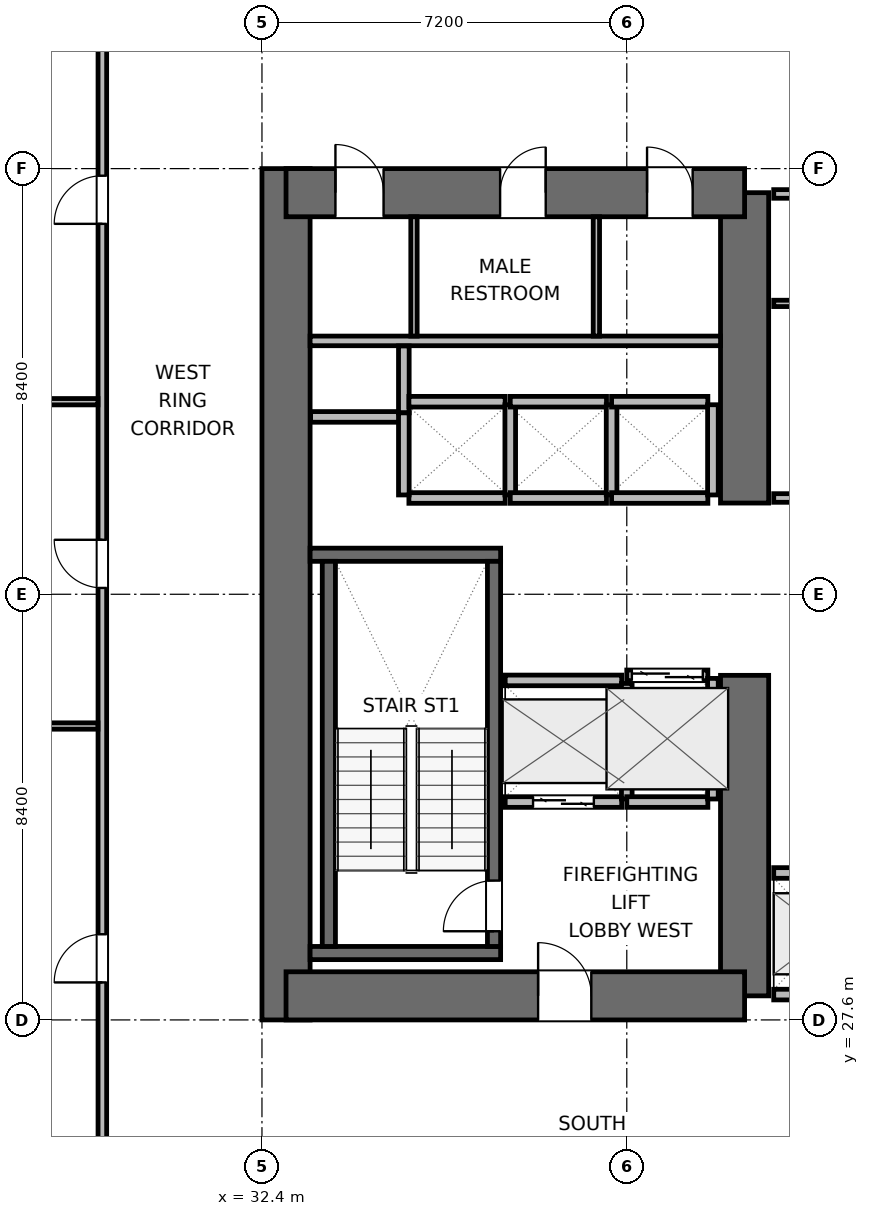
"""IFC4 building model, lengths in metres.
Left out: names, types, materials, properties, quantities, classifications, styles, units other than length and angle.
Written with IfcOpenShell. Run it as: python <this file> out.ifc"""

import sys

from ifc_helpers import new_model, si_unit, direction, frame, frame_2d, origin, place, context, subcontext, project, spatial, rectangle, extrude, element, fill, save


model = new_model("IFC4")
c1 = context("Model", 3, precision=1e-05, world=origin(), true_north=direction((0.0, 1.0)))
c2 = subcontext(c1, "Body", "Model", "MODEL_VIEW")
j1 = project(units=[si_unit("LENGTHUNIT", "METRE"), si_unit("PLANEANGLEUNIT", "RADIAN")], contexts=[c1])
p1 = place(None, origin())
s1 = spatial("IfcSite", under=j1, at=p1, CompositionType="ELEMENT")
p2 = place(p1, origin())
s2 = spatial("IfcBuilding", under=s1, at=p2, CompositionType="ELEMENT")
p3 = place(p2, frame((0.0, 0.0, 89.7)))
s3 = spatial("IfcBuildingStorey", under=s2, at=p3, CompositionType="ELEMENT", Elevation=89.7)
p4 = place(p3, frame((32.875, 27.6, 0.0), z_axis=(0.0, 0.0, 1.0), x_axis=(0.0, 1.0, 0.0)))
e1 = element("IfcWall", 1, at=p4, inside=s3, PredefinedType="SHEAR", context=c2, shape_type="SweptSolid", body=[
    extrude(rectangle(XDim=16.8, YDim=0.95, at=frame_2d((8.4, 0.0))), origin(), (0.0, 0.0, 1.0), 3.9),
])
p5 = place(p3, frame((41.925, 28.075, 0.0), z_axis=(0.0, 0.0, 1.0), x_axis=(0.0, 1.0, 0.0)))
e2 = element("IfcWall", 2, at=p5, inside=s3, PredefinedType="SHEAR", context=c2, shape_type="SweptSolid", body=[
    extrude(rectangle(XDim=6.325, YDim=0.95, at=frame_2d((3.163, 0.0))), origin(), (0.0, 0.0, 1.0), 3.9),
])
p6 = place(p3, frame((41.925, 37.8, 0.0), z_axis=(0.0, 0.0, 1.0), x_axis=(0.0, 1.0, 0.0)))
e3 = element("IfcWall", 3, at=p6, inside=s3, PredefinedType="SHEAR", context=c2, shape_type="SweptSolid", body=[
    extrude(rectangle(XDim=6.125, YDim=0.95, at=frame_2d((3.062, 0.0))), origin(), (0.0, 0.0, 1.0), 3.9),
])
p7 = place(p3, frame((32.875, 28.075, 0.0), z_axis=(0.0, 0.0, 1.0), x_axis=(1.0, 0.0, 0.0)))
e4 = element("IfcWall", 4, at=p7, inside=s3, PredefinedType="SHEAR", context=c2, shape_type="SweptSolid", body=[
    extrude(rectangle(XDim=9.05, YDim=0.95, at=frame_2d((4.525, 0.0))), origin(), (0.0, 0.0, 1.0), 3.9),
])
p8 = place(p7, frame((4.975, 0.0, 0.0)))
e5 = element("IfcOpeningElement", 5, at=p8, cuts=e4, PredefinedType="OPENING", context=c2, shape_type="SweptSolid", body=[
    extrude(rectangle(XDim=1.05, YDim=2.04, at=frame_2d((0.525, 1.02))), frame((0.0, 0.485, 0.0), z_axis=(0.0, -1.0, 0.0), x_axis=(1.0, 0.0, 0.0)), (0.0, 0.0, 1.0), 0.97),
])
p9 = place(p3, frame((32.875, 43.925, 0.0), z_axis=(0.0, 0.0, 1.0), x_axis=(1.0, 0.0, 0.0)))
e6 = element("IfcWall", 6, at=p9, inside=s3, PredefinedType="SHEAR", context=c2, shape_type="SweptSolid", body=[
    extrude(rectangle(XDim=9.05, YDim=0.95, at=frame_2d((4.525, 0.0))), origin(), (0.0, 0.0, 1.0), 3.9),
])
p10 = place(p9, frame((0.975, 0.0, 0.0)))
e7 = element("IfcOpeningElement", 7, at=p10, cuts=e6, PredefinedType="OPENING", context=c2, shape_type="SweptSolid", body=[
    extrude(rectangle(XDim=0.95, YDim=2.04, at=frame_2d((0.475, 1.02))), frame((0.0, 0.485, 0.0), z_axis=(0.0, -1.0, 0.0), x_axis=(1.0, 0.0, 0.0)), (0.0, 0.0, 1.0), 0.97),
])
p11 = place(p9, frame((4.225, 0.0, 0.0)))
e8 = element("IfcOpeningElement", 8, at=p11, cuts=e6, PredefinedType="OPENING", context=c2, shape_type="SweptSolid", body=[
    extrude(rectangle(XDim=0.9, YDim=2.02, at=frame_2d((0.45, 1.01))), frame((0.0, 0.485, 0.0), z_axis=(0.0, -1.0, 0.0), x_axis=(1.0, 0.0, 0.0)), (0.0, 0.0, 1.0), 0.97),
])
p12 = place(p9, frame((7.125, 0.0, 0.0)))
e9 = element("IfcOpeningElement", 9, at=p12, cuts=e6, PredefinedType="OPENING", context=c2, shape_type="SweptSolid", body=[
    extrude(rectangle(XDim=0.9, YDim=2.02, at=frame_2d((0.45, 1.01))), frame((0.0, 0.485, 0.0), z_axis=(0.0, -1.0, 0.0), x_axis=(1.0, 0.0, 0.0)), (0.0, 0.0, 1.0), 0.97),
])
for number, where, z_axis, x_axis in (
    (10, (33.35, 28.92, 0.0), (0.0, 0.0, 1.0), (1.0, 0.0, 0.0)),
    (11, (33.35, 36.78, 0.0), (0.0, 0.0, 1.0), (1.0, 0.0, 0.0)),
):
    element("IfcWall", number, at=place(p3, frame(where, z_axis=z_axis, x_axis=x_axis)), inside=s3, PredefinedType="SHEAR", context=c2, shape_type="SweptSolid", body=[
        extrude(rectangle(XDim=3.76, YDim=0.26, at=frame_2d((1.88, 0.0))), origin(), (0.0, 0.0, 1.0), 3.9),
    ])
p13 = place(p3, frame((33.72, 29.05, 0.0), z_axis=(0.0, 0.0, 1.0), x_axis=(0.0, 1.0, 0.0)))
e12 = element("IfcWall", 12, at=p13, inside=s3, PredefinedType="SHEAR", context=c2, shape_type="SweptSolid", body=[
    extrude(rectangle(XDim=7.6, YDim=0.26, at=frame_2d((3.8, 0.0))), origin(), (0.0, 0.0, 1.0), 3.9),
])
p14 = place(p3, frame((36.98, 29.05, 0.0), z_axis=(0.0, 0.0, 1.0), x_axis=(0.0, 1.0, 0.0)))
e13 = element("IfcWall", 13, at=p14, inside=s3, PredefinedType="SHEAR", context=c2, shape_type="SweptSolid", body=[
    extrude(rectangle(XDim=7.6, YDim=0.26, at=frame_2d((3.8, 0.0))), origin(), (0.0, 0.0, 1.0), 3.9),
])
p15 = place(p14, frame((0.3, 0.0, 0.0)))
e14 = element("IfcOpeningElement", 14, at=p15, cuts=e13, PredefinedType="OPENING", context=c2, shape_type="SweptSolid", body=[
    extrude(rectangle(XDim=1.0, YDim=2.04, at=frame_2d((0.5, 1.02))), frame((0.0, 0.14, 0.0), z_axis=(0.0, -1.0, 0.0), x_axis=(1.0, 0.0, 0.0)), (0.0, 0.0, 1.0), 0.28),
])
p16 = place(p3, frame((33.35, 41.0, 0.0), z_axis=(0.0, 0.0, 1.0), x_axis=(1.0, 0.0, 0.0)))
e15 = element("IfcWall", 15, at=p16, inside=s3, PredefinedType="PLUMBINGWALL", context=c2, shape_type="SweptSolid", body=[
    extrude(rectangle(XDim=8.1, YDim=0.19, at=frame_2d((4.05, 0.0))), origin(), (0.0, 0.0, 1.0), 3.64),
])
for number, where, z_axis, x_axis in (
    (16, (35.4, 41.095, 0.0), (0.0, 0.0, 1.0), (0.0, 1.0, 0.0)),
    (17, (39.0, 41.095, 0.0), (0.0, 0.0, 1.0), (0.0, 1.0, 0.0)),
):
    element("IfcWall", number, at=place(p3, frame(where, z_axis=z_axis, x_axis=x_axis)), inside=s3, PredefinedType="PARTITIONING", context=c2, shape_type="SweptSolid", body=[
        extrude(rectangle(XDim=2.355, YDim=0.125, at=frame_2d((1.177, 0.0))), origin(), (0.0, 0.0, 1.0), 3.64),
    ])
p17 = place(p3, frame((33.36, 39.5, 0.0), z_axis=(0.0, 0.0, 1.0), x_axis=(1.0, 0.0, 0.0)))
e18 = element("IfcWall", 18, at=p17, inside=s3, PredefinedType="PARTITIONING", context=c2, shape_type="SweptSolid", body=[
    extrude(rectangle(XDim=1.86, YDim=0.21, at=frame_2d((0.93, 0.0))), origin(), (0.0, 0.0, 1.0), 3.64),
])
p18 = place(p3, frame((35.2, 39.58, 0.0), z_axis=(0.0, 0.0, 1.0), x_axis=(0.0, 1.0, 0.0)))
e19 = element("IfcWall", 19, at=p18, inside=s3, PredefinedType="PARTITIONING", context=c2, shape_type="SweptSolid", body=[
    extrude(rectangle(XDim=1.32, YDim=0.21, at=frame_2d((0.66, 0.0))), origin(), (0.0, 0.0, 1.0), 3.64),
])
p19 = place(p3, frame((37.2, 31.9, 0.0), z_axis=(0.0, 0.0, 1.0), x_axis=(1.0, 0.0, 0.0)))
e20 = element("IfcWall", 20, at=p19, inside=s3, PredefinedType="PARTITIONING", context=c2, shape_type="SweptSolid", body=[
    extrude(rectangle(XDim=2.3, YDim=0.21, at=frame_2d((1.15, 0.0))), origin(), (0.0, 0.0, 1.0), 3.64),
])
p20 = place(p19, frame((0.55, 0.0, 0.0)))
e21 = element("IfcOpeningElement", 21, at=p20, cuts=e20, PredefinedType="OPENING", context=c2, shape_type="SweptSolid", body=[
    extrude(rectangle(XDim=1.2, YDim=2.04, at=frame_2d((0.6, 1.02))), frame((0.0, 0.115, 0.0), z_axis=(0.0, -1.0, 0.0), x_axis=(1.0, 0.0, 0.0)), (0.0, 0.0, 1.0), 0.23),
])
p21 = place(p3, frame((37.2, 34.3, 0.0), z_axis=(0.0, 0.0, 1.0), x_axis=(1.0, 0.0, 0.0)))
e22 = element("IfcWall", 22, at=p21, inside=s3, PredefinedType="PARTITIONING", context=c2, shape_type="SweptSolid", body=[
    extrude(rectangle(XDim=2.3, YDim=0.21, at=frame_2d((1.15, 0.0))), origin(), (0.0, 0.0, 1.0), 3.64),
])
p22 = place(p3, frame((39.6, 31.96, 0.0), z_axis=(0.0, 0.0, 1.0), x_axis=(0.0, 1.0, 0.0)))
e23 = element("IfcWall", 23, at=p22, inside=s3, PredefinedType="PARTITIONING", context=c2, shape_type="SweptSolid", body=[
    extrude(rectangle(XDim=2.28, YDim=0.21, at=frame_2d((1.14, 0.0))), origin(), (0.0, 0.0, 1.0), 3.64),
])
p23 = place(p3, frame((39.6, 34.4, 0.0), z_axis=(0.0, 0.0, 1.0), x_axis=(1.0, 0.0, 0.0)))
e24 = element("IfcWall", 24, at=p23, inside=s3, PredefinedType="PARTITIONING", context=c2, shape_type="SweptSolid", body=[
    extrude(rectangle(XDim=1.6, YDim=0.21, at=frame_2d((0.8, 0.0))), origin(), (0.0, 0.0, 1.0), 3.64),
])
p24 = place(p23, frame((0.1, 0.0, 0.0)))
e25 = element("IfcOpeningElement", 25, at=p24, cuts=e24, PredefinedType="OPENING", context=c2, shape_type="SweptSolid", body=[
    extrude(rectangle(XDim=1.4, YDim=2.06, at=frame_2d((0.7, 1.03))), frame((0.0, 0.115, 0.0), z_axis=(0.0, -1.0, 0.0), x_axis=(1.0, 0.0, 0.0)), (0.0, 0.0, 1.0), 0.23),
])
p25 = place(p3, frame((39.6, 31.9, 0.0), z_axis=(0.0, 0.0, 1.0), x_axis=(1.0, 0.0, 0.0)))
e26 = element("IfcWall", 26, at=p25, inside=s3, PredefinedType="PARTITIONING", context=c2, shape_type="SweptSolid", body=[
    extrude(rectangle(XDim=1.6, YDim=0.21, at=frame_2d((0.8, 0.0))), origin(), (0.0, 0.0, 1.0), 3.64),
])
p26 = place(p3, frame((41.3, 31.96, 0.0), z_axis=(0.0, 0.0, 1.0), x_axis=(0.0, 1.0, 0.0)))
e27 = element("IfcWall", 27, at=p26, inside=s3, PredefinedType="PARTITIONING", context=c2, shape_type="SweptSolid", body=[
    extrude(rectangle(XDim=2.38, YDim=0.21, at=frame_2d((1.19, 0.0))), origin(), (0.0, 0.0, 1.0), 3.64),
])
p27 = place(p3, frame((42.5, 30.5, 0.0), z_axis=(0.0, 0.0, 1.0), x_axis=(1.0, 0.0, 0.0)))
e28 = element("IfcWall", 28, at=p27, inside=s3, PredefinedType="PARTITIONING", context=c2, shape_type="SweptSolid", body=[
    extrude(rectangle(XDim=2.1, YDim=0.21, at=frame_2d((1.05, 0.0))), origin(), (0.0, 0.0, 1.0), 3.64),
])
p28 = place(p27, frame((0.5, 0.0, 0.0)))
e29 = element("IfcOpeningElement", 29, at=p28, cuts=e28, PredefinedType="OPENING", context=c2, shape_type="SweptSolid", body=[
    extrude(rectangle(XDim=1.1, YDim=2.04, at=frame_2d((0.55, 1.02))), frame((0.0, 0.115, 0.0), z_axis=(0.0, -1.0, 0.0), x_axis=(1.0, 0.0, 0.0)), (0.0, 0.0, 1.0), 0.23),
])
p29 = place(p3, frame((42.5, 28.1, 0.0), z_axis=(0.0, 0.0, 1.0), x_axis=(1.0, 0.0, 0.0)))
e30 = element("IfcWall", 30, at=p29, inside=s3, PredefinedType="PARTITIONING", context=c2, shape_type="SweptSolid", body=[
    extrude(rectangle(XDim=2.1, YDim=0.21, at=frame_2d((1.05, 0.0))), origin(), (0.0, 0.0, 1.0), 2.525),
])
for number, where, z_axis, x_axis in (
    (31, (35.3, 37.9, 0.0), (0.0, 0.0, 1.0), (1.0, 0.0, 0.0)),
    (32, (35.3, 39.8, 0.0), (0.0, 0.0, 1.0), (1.0, 0.0, 0.0)),
):
    element("IfcWall", number, at=place(p3, frame(where, z_axis=z_axis, x_axis=x_axis)), inside=s3, PredefinedType="PARTITIONING", context=c2, shape_type="SweptSolid", body=[
        extrude(rectangle(XDim=1.9, YDim=0.21, at=frame_2d((0.95, 0.0))), origin(), (0.0, 0.0, 1.0), 3.64),
    ])
p30 = place(p3, frame((35.2, 37.96, 0.0), z_axis=(0.0, 0.0, 1.0), x_axis=(0.0, 1.0, 0.0)))
e33 = element("IfcWall", 33, at=p30, inside=s3, PredefinedType="PARTITIONING", context=c2, shape_type="SweptSolid", body=[
    extrude(rectangle(XDim=1.62, YDim=0.21, at=frame_2d((0.81, 0.0))), origin(), (0.0, 0.0, 1.0), 3.64),
])
p31 = place(p3, frame((37.3, 37.96, 0.0), z_axis=(0.0, 0.0, 1.0), x_axis=(0.0, 1.0, 0.0)))
e34 = element("IfcWall", 34, at=p31, inside=s3, PredefinedType="PARTITIONING", context=c2, shape_type="SweptSolid", body=[
    extrude(rectangle(XDim=1.78, YDim=0.21, at=frame_2d((0.89, 0.0))), origin(), (0.0, 0.0, 1.0), 3.64),
])
for number, where, z_axis, x_axis in (
    (35, (37.3, 37.9, 0.0), (0.0, 0.0, 1.0), (1.0, 0.0, 0.0)),
    (36, (37.3, 39.8, 0.0), (0.0, 0.0, 1.0), (1.0, 0.0, 0.0)),
):
    element("IfcWall", number, at=place(p3, frame(where, z_axis=z_axis, x_axis=x_axis)), inside=s3, PredefinedType="PARTITIONING", context=c2, shape_type="SweptSolid", body=[
        extrude(rectangle(XDim=1.9, YDim=0.21, at=frame_2d((0.95, 0.0))), origin(), (0.0, 0.0, 1.0), 3.64),
    ])
p32 = place(p3, frame((39.3, 37.96, 0.0), z_axis=(0.0, 0.0, 1.0), x_axis=(0.0, 1.0, 0.0)))
e37 = element("IfcWall", 37, at=p32, inside=s3, PredefinedType="PARTITIONING", context=c2, shape_type="SweptSolid", body=[
    extrude(rectangle(XDim=1.78, YDim=0.21, at=frame_2d((0.89, 0.0))), origin(), (0.0, 0.0, 1.0), 3.64),
])
for number, where, z_axis, x_axis in (
    (38, (39.3, 37.9, 0.0), (0.0, 0.0, 1.0), (1.0, 0.0, 0.0)),
    (39, (39.3, 39.8, 0.0), (0.0, 0.0, 1.0), (1.0, 0.0, 0.0)),
):
    element("IfcWall", number, at=place(p3, frame(where, z_axis=z_axis, x_axis=x_axis)), inside=s3, PredefinedType="PARTITIONING", context=c2, shape_type="SweptSolid", body=[
        extrude(rectangle(XDim=1.9, YDim=0.21, at=frame_2d((0.95, 0.0))), origin(), (0.0, 0.0, 1.0), 3.64),
    ])
p33 = place(p3, frame((41.3, 37.96, 0.0), z_axis=(0.0, 0.0, 1.0), x_axis=(0.0, 1.0, 0.0)))
e40 = element("IfcWall", 40, at=p33, inside=s3, PredefinedType="PARTITIONING", context=c2, shape_type="SweptSolid", body=[
    extrude(rectangle(XDim=1.78, YDim=0.21, at=frame_2d((0.89, 0.0))), origin(), (0.0, 0.0, 1.0), 3.64),
])
p34 = place(p3, frame((42.5, 37.9, 0.0), z_axis=(0.0, 0.0, 1.0), x_axis=(1.0, 0.0, 0.0)))
e41 = element("IfcWall", 41, at=p34, inside=s3, PredefinedType="PARTITIONING", context=c2, shape_type="SweptSolid", body=[
    extrude(rectangle(XDim=4.213, YDim=0.17, at=frame_2d((2.106, 0.0))), origin(), (0.0, 0.0, 1.0), 3.64),
])
p35 = place(p3, frame((42.5, 43.9, 0.0), z_axis=(0.0, 0.0, 1.0), x_axis=(1.0, 0.0, 0.0)))
e42 = element("IfcWall", 42, at=p35, inside=s3, PredefinedType="PARTITIONING", context=c2, shape_type="SweptSolid", body=[
    extrude(rectangle(XDim=4.213, YDim=0.17, at=frame_2d((2.106, 0.0))), origin(), (0.0, 0.0, 1.0), 2.525),
])
p36 = place(p3, frame((42.5, 41.74, 0.0), z_axis=(0.0, 0.0, 1.0), x_axis=(1.0, 0.0, 0.0)))
e43 = element("IfcWall", 43, at=p36, inside=s3, PredefinedType="PARTITIONING", context=c2, shape_type="SweptSolid", body=[
    extrude(rectangle(XDim=4.213, YDim=0.125, at=frame_2d((2.106, 0.0))), origin(), (0.0, 0.0, 1.0), 3.64),
])
p37 = place(p3, frame((29.25, 24.317, 0.0), z_axis=(0.0, 0.0, 1.0), x_axis=(0.0, 1.0, 0.0)))
e44 = element("IfcWall", 44, at=p37, inside=s3, PredefinedType="PARTITIONING", context=c2, shape_type="SweptSolid", body=[
    extrude(rectangle(XDim=23.366, YDim=0.17, at=frame_2d((11.683, 0.0))), origin(), (0.0, 0.0, 1.0), 3.64),
])
p38 = place(p37, frame((4.023, 0.0, 0.0)))
e45 = element("IfcOpeningElement", 45, at=p38, cuts=e44, PredefinedType="OPENING", context=c2, shape_type="SweptSolid", body=[
    extrude(rectangle(XDim=0.95, YDim=2.04, at=frame_2d((0.475, 1.02))), frame((0.0, 0.095, 0.0), z_axis=(0.0, -1.0, 0.0), x_axis=(1.0, 0.0, 0.0)), (0.0, 0.0, 1.0), 0.19),
])
p39 = place(p37, frame((11.808, 0.0, 0.0)))
e46 = element("IfcOpeningElement", 46, at=p39, cuts=e44, PredefinedType="OPENING", context=c2, shape_type="SweptSolid", body=[
    extrude(rectangle(XDim=0.95, YDim=2.04, at=frame_2d((0.475, 1.02))), frame((0.0, 0.095, 0.0), z_axis=(0.0, -1.0, 0.0), x_axis=(1.0, 0.0, 0.0)), (0.0, 0.0, 1.0), 0.19),
])
p40 = place(p37, frame((18.993, 0.0, 0.0)))
e47 = element("IfcOpeningElement", 47, at=p40, cuts=e44, PredefinedType="OPENING", context=c2, shape_type="SweptSolid", body=[
    extrude(rectangle(XDim=0.95, YDim=2.04, at=frame_2d((0.475, 1.02))), frame((0.0, 0.095, 0.0), z_axis=(0.0, -1.0, 0.0), x_axis=(1.0, 0.0, 0.0)), (0.0, 0.0, 1.0), 0.19),
])
p41 = place(p3, frame((20.375, 33.4, 0.0), z_axis=(0.0, 0.0, 1.0), x_axis=(1.0, 0.0, 0.0)))
e48 = element("IfcWall", 48, at=p41, inside=s3, PredefinedType="PARTITIONING", context=c2, shape_type="SweptSolid", body=[
    extrude(rectangle(XDim=8.788, YDim=0.125, at=frame_2d((4.394, 0.0))), origin(), (0.0, 0.0, 1.0), 3.64),
])
p42 = place(p3, frame((18.245, 39.8, 0.0), z_axis=(0.0, 0.0, 1.0), x_axis=(1.0, 0.0, 0.0)))
e49 = element("IfcWall", 49, at=p42, inside=s3, PredefinedType="PARTITIONING", context=c2, shape_type="SweptSolid", body=[
    extrude(rectangle(XDim=10.918, YDim=0.125, at=frame_2d((5.459, 0.0))), origin(), (0.0, 0.0, 1.0), 3.64),
])
p43 = place(p15, origin())
e50 = element("IfcDoor", 50, at=p43, inside=s3, OperationType="SINGLE_SWING_LEFT", PredefinedType="DOOR", context=c2, shape_type="SweptSolid", body=[
    extrude(rectangle(XDim=1.0, YDim=2.04, at=frame_2d((0.5, 1.02))), frame((0.0, 0.025, 0.0), z_axis=(0.0, -1.0, 0.0), x_axis=(1.0, 0.0, 0.0)), (0.0, 0.0, 1.0), 0.05),
])
fill(e14, e50)
p44 = place(p20, origin())
e51 = element("IfcDoor", 51, at=p44, inside=s3, OperationType="DOUBLE_DOOR_SLIDING", PredefinedType="DOOR", context=c2, shape_type="SweptSolid", body=[
    extrude(rectangle(XDim=1.2, YDim=2.04, at=frame_2d((0.6, 1.02))), frame((0.0, 0.025, 0.0), z_axis=(0.0, -1.0, 0.0), x_axis=(1.0, 0.0, 0.0)), (0.0, 0.0, 1.0), 0.05),
])
fill(e21, e51)
p45 = place(p24, origin())
e52 = element("IfcDoor", 52, at=p45, inside=s3, OperationType="DOUBLE_DOOR_SLIDING", PredefinedType="DOOR", context=c2, shape_type="SweptSolid", body=[
    extrude(rectangle(XDim=1.4, YDim=2.06, at=frame_2d((0.7, 1.03))), frame((0.0, 0.025, 0.0), z_axis=(0.0, -1.0, 0.0), x_axis=(1.0, 0.0, 0.0)), (0.0, 0.0, 1.0), 0.05),
])
fill(e25, e52)
p46 = place(p8, origin())
e53 = element("IfcDoor", 53, at=p46, inside=s3, OperationType="SINGLE_SWING_LEFT", PredefinedType="DOOR", context=c2, shape_type="SweptSolid", body=[
    extrude(rectangle(XDim=1.05, YDim=2.04, at=frame_2d((0.525, 1.02))), frame((0.0, 0.025, 0.0), z_axis=(0.0, -1.0, 0.0), x_axis=(1.0, 0.0, 0.0)), (0.0, 0.0, 1.0), 0.05),
])
fill(e5, e53)
p47 = place(p10, origin())
e54 = element("IfcDoor", 54, at=p47, inside=s3, OperationType="SINGLE_SWING_LEFT", PredefinedType="DOOR", context=c2, shape_type="SweptSolid", body=[
    extrude(rectangle(XDim=0.95, YDim=2.04, at=frame_2d((0.475, 1.02))), frame((0.0, 0.025, 0.0), z_axis=(0.0, -1.0, 0.0), x_axis=(1.0, 0.0, 0.0)), (0.0, 0.0, 1.0), 0.05),
])
fill(e7, e54)
p48 = place(p11, origin())
e55 = element("IfcDoor", 55, at=p48, inside=s3, OperationType="SINGLE_SWING_RIGHT", PredefinedType="DOOR", context=c2, shape_type="SweptSolid", body=[
    extrude(rectangle(XDim=0.9, YDim=2.02, at=frame_2d((0.45, 1.01))), frame((0.0, 0.025, 0.0), z_axis=(0.0, -1.0, 0.0), x_axis=(1.0, 0.0, 0.0)), (0.0, 0.0, 1.0), 0.05),
])
fill(e8, e55)
p49 = place(p12, origin())
e56 = element("IfcDoor", 56, at=p49, inside=s3, OperationType="SINGLE_SWING_LEFT", PredefinedType="DOOR", context=c2, shape_type="SweptSolid", body=[
    extrude(rectangle(XDim=0.9, YDim=2.02, at=frame_2d((0.45, 1.01))), frame((0.0, 0.025, 0.0), z_axis=(0.0, -1.0, 0.0), x_axis=(1.0, 0.0, 0.0)), (0.0, 0.0, 1.0), 0.05),
])
fill(e9, e56)
p50 = place(p38, origin())
e57 = element("IfcDoor", 57, at=p50, inside=s3, OperationType="SINGLE_SWING_LEFT", PredefinedType="DOOR", context=c2, shape_type="SweptSolid", body=[
    extrude(rectangle(XDim=0.95, YDim=2.04, at=frame_2d((0.475, 1.02))), frame((0.0, 0.025, 0.0), z_axis=(0.0, -1.0, 0.0), x_axis=(1.0, 0.0, 0.0)), (0.0, 0.0, 1.0), 0.05),
])
fill(e45, e57)
p51 = place(p39, origin())
e58 = element("IfcDoor", 58, at=p51, inside=s3, OperationType="SINGLE_SWING_RIGHT", PredefinedType="DOOR", context=c2, shape_type="SweptSolid", body=[
    extrude(rectangle(XDim=0.95, YDim=2.04, at=frame_2d((0.475, 1.02))), frame((0.0, 0.025, 0.0), z_axis=(0.0, -1.0, 0.0), x_axis=(1.0, 0.0, 0.0)), (0.0, 0.0, 1.0), 0.05),
])
fill(e46, e58)
p52 = place(p40, origin())
e59 = element("IfcDoor", 59, at=p52, inside=s3, OperationType="SINGLE_SWING_LEFT", PredefinedType="DOOR", context=c2, shape_type="SweptSolid", body=[
    extrude(rectangle(XDim=0.95, YDim=2.04, at=frame_2d((0.475, 1.02))), frame((0.0, 0.025, 0.0), z_axis=(0.0, -1.0, 0.0), x_axis=(1.0, 0.0, 0.0)), (0.0, 0.0, 1.0), 0.05),
])
fill(e47, e59)
save(model, sys.argv[1])
